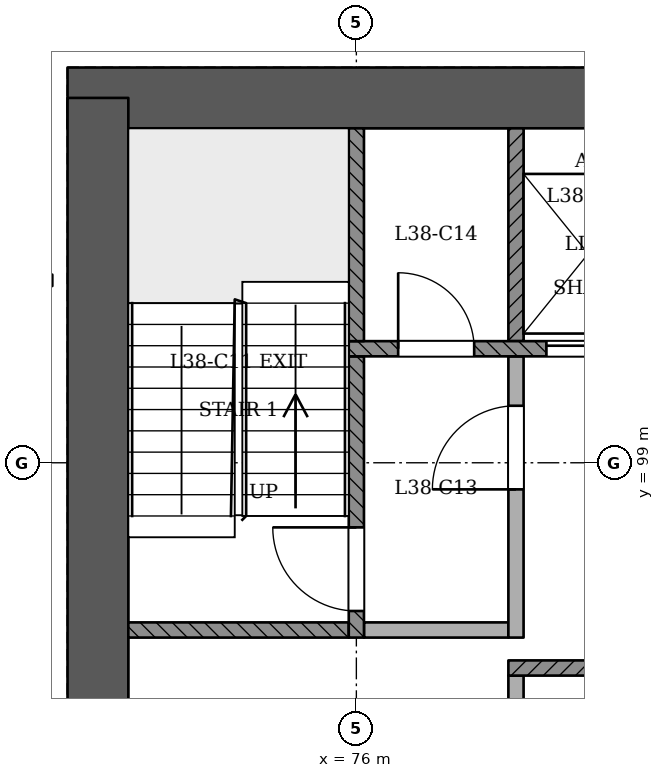
"""IFC4 building model, lengths in metres.
Left out: names, types, materials, properties, quantities, classifications, styles, units other than length and angle.
Written with IfcOpenShell. Run it as: python <this file> out.ifc"""

import sys

from ifc_helpers import new_model, si_unit, direction, frame, frame_2d, origin, place, context, subcontext, project, spatial, rectangle, extrude, element, fill, save


model = new_model("IFC4")
c1 = context("Model", 3, precision=1e-05, world=origin(), true_north=direction((0.0, 1.0)))
c2 = subcontext(c1, "Body", "Model", "MODEL_VIEW")
j1 = project(units=[si_unit("LENGTHUNIT", "METRE"), si_unit("PLANEANGLEUNIT", "RADIAN")], contexts=[c1])
p1 = place(None, origin())
s1 = spatial("IfcSite", under=j1, at=p1, CompositionType="ELEMENT")
p2 = place(p1, origin())
s2 = spatial("IfcBuilding", under=s1, at=p2, CompositionType="ELEMENT")
p3 = place(p2, frame((0.0, 0.0, 149.4)))
s3 = spatial("IfcBuildingStorey", under=s2, at=p3, CompositionType="ELEMENT", Elevation=149.4)
p4 = place(p3, frame((97.4, 103.8, 0.0), z_axis=(0.0, 0.0, 1.0), x_axis=(-1.0, 0.0, 0.0)))
e1 = element("IfcWall", 1, at=p4, inside=s3, PredefinedType="SHEAR", context=c2, shape_type="SweptSolid", body=[
    extrude(rectangle(XDim=25.2, YDim=0.8, at=frame_2d((12.6, 0.0))), origin(), (0.0, 0.0, 1.0), 3.6),
])
p5 = place(p3, frame((72.6, 103.8, 0.0), z_axis=(0.0, 0.0, 1.0), x_axis=(0.0, -1.0, 0.0)))
e2 = element("IfcWall", 2, at=p5, inside=s3, PredefinedType="SHEAR", context=c2, shape_type="SweptSolid", body=[
    extrude(rectangle(XDim=11.2, YDim=0.8, at=frame_2d((5.6, 0.0))), origin(), (0.0, 0.0, 1.0), 3.6),
])
p6 = place(p3, frame((65.324, 98.5, 0.0), z_axis=(0.0, 0.0, 1.0), x_axis=(0.500001898363, -0.866024307761, 0.0)))
e3 = element("IfcWall", 3, at=p6, inside=s3, PredefinedType="PARTITIONING", context=c2, shape_type="SweptSolid", body=[
    extrude(rectangle(XDim=39.351, YDim=0.15, at=frame_2d((19.675, 0.0))), origin(), (0.0, 0.0, 1.0), 2.75),
])
p7 = place(p6, frame((0.2, 0.0, 0.0)))
e4 = element("IfcOpeningElement", 4, at=p7, cuts=e3, PredefinedType="OPENING", context=c2, shape_type="SweptSolid", body=[
    extrude(rectangle(XDim=1.2, YDim=2.1, at=frame_2d((0.6, 1.05))), frame((0.0, 0.085, 0.0), z_axis=(0.0, -1.0, 0.0), x_axis=(1.0, 0.0, 0.0)), (0.0, 0.0, 1.0), 0.171),
])
p8 = place(p6, frame((3.425, 0.0, 0.0)))
e5 = element("IfcOpeningElement", 5, at=p8, cuts=e3, PredefinedType="OPENING", context=c2, shape_type="SweptSolid", body=[
    extrude(rectangle(XDim=1.0, YDim=2.1, at=frame_2d((0.5, 1.05))), frame((0.0, 0.085, 0.0), z_axis=(0.0, -1.0, 0.0), x_axis=(1.0, 0.0, 0.0)), (0.0, 0.0, 1.0), 0.171),
])
p9 = place(p6, frame((9.004, 0.0, 0.0)))
e6 = element("IfcOpeningElement", 6, at=p9, cuts=e3, PredefinedType="OPENING", context=c2, shape_type="SweptSolid", body=[
    extrude(rectangle(XDim=1.1, YDim=2.1, at=frame_2d((0.55, 1.05))), frame((0.0, 0.085, 0.0), z_axis=(0.0, -1.0, 0.0), x_axis=(1.0, 0.0, 0.0)), (0.0, 0.0, 1.0), 0.171),
])
p10 = place(p6, frame((11.396, 0.0, 0.0)))
e7 = element("IfcOpeningElement", 7, at=p10, cuts=e3, PredefinedType="OPENING", context=c2, shape_type="SweptSolid", body=[
    extrude(rectangle(XDim=1.0, YDim=2.1, at=frame_2d((0.5, 1.05))), frame((0.0, 0.085, 0.0), z_axis=(0.0, -1.0, 0.0), x_axis=(1.0, 0.0, 0.0)), (0.0, 0.0, 1.0), 0.171),
])
p11 = place(p6, frame((17.955, 0.0, 0.0)))
e8 = element("IfcOpeningElement", 8, at=p11, cuts=e3, PredefinedType="OPENING", context=c2, shape_type="SweptSolid", body=[
    extrude(rectangle(XDim=1.0, YDim=2.1, at=frame_2d((0.5, 1.05))), frame((0.0, 0.085, 0.0), z_axis=(0.0, -1.0, 0.0), x_axis=(1.0, 0.0, 0.0)), (0.0, 0.0, 1.0), 0.171),
])
p12 = place(p6, frame((20.396, 0.0, 0.0)))
e9 = element("IfcOpeningElement", 9, at=p12, cuts=e3, PredefinedType="OPENING", context=c2, shape_type="SweptSolid", body=[
    extrude(rectangle(XDim=1.0, YDim=2.1, at=frame_2d((0.5, 1.05))), frame((0.0, 0.085, 0.0), z_axis=(0.0, -1.0, 0.0), x_axis=(1.0, 0.0, 0.0)), (0.0, 0.0, 1.0), 0.171),
])
p13 = place(p6, frame((26.955, 0.0, 0.0)))
e10 = element("IfcOpeningElement", 10, at=p13, cuts=e3, PredefinedType="OPENING", context=c2, shape_type="SweptSolid", body=[
    extrude(rectangle(XDim=1.0, YDim=2.1, at=frame_2d((0.5, 1.05))), frame((0.0, 0.085, 0.0), z_axis=(0.0, -1.0, 0.0), x_axis=(1.0, 0.0, 0.0)), (0.0, 0.0, 1.0), 0.171),
])
p14 = place(p6, frame((29.396, 0.0, 0.0)))
e11 = element("IfcOpeningElement", 11, at=p14, cuts=e3, PredefinedType="OPENING", context=c2, shape_type="SweptSolid", body=[
    extrude(rectangle(XDim=1.0, YDim=2.1, at=frame_2d((0.5, 1.05))), frame((0.0, 0.085, 0.0), z_axis=(0.0, -1.0, 0.0), x_axis=(1.0, 0.0, 0.0)), (0.0, 0.0, 1.0), 0.171),
])
p15 = place(p6, frame((36.004, 0.0, 0.0)))
e12 = element("IfcOpeningElement", 12, at=p15, cuts=e3, PredefinedType="OPENING", context=c2, shape_type="SweptSolid", body=[
    extrude(rectangle(XDim=1.1, YDim=2.1, at=frame_2d((0.55, 1.05))), frame((0.0, 0.085, 0.0), z_axis=(0.0, -1.0, 0.0), x_axis=(1.0, 0.0, 0.0)), (0.0, 0.0, 1.0), 0.171),
])
p16 = place(p3, frame((78.1, 93.4, 0.0), z_axis=(0.0, 0.0, 1.0), x_axis=(0.0, 1.0, 0.0)))
e13 = element("IfcWall", 13, at=p16, inside=s3, PredefinedType="PARTITIONING", context=c2, shape_type="SweptSolid", body=[
    extrude(rectangle(XDim=2.8, YDim=0.2, at=frame_2d((1.4, 0.0))), origin(), (0.0, 0.0, 1.0), 3.15),
])
p17 = place(p3, frame((78.0, 96.3, 0.0), z_axis=(0.0, 0.0, 1.0), x_axis=(1.0, 0.0, 0.0)))
e14 = element("IfcWall", 14, at=p17, inside=s3, PredefinedType="SOLIDWALL", context=c2, shape_type="SweptSolid", body=[
    extrude(rectangle(XDim=7.8, YDim=0.2, at=frame_2d((3.9, 0.0))), origin(), (0.0, 0.0, 1.0), 3.15),
])
p18 = place(p17, frame((1.5, 0.0, 0.0)))
e15 = element("IfcOpeningElement", 15, at=p18, cuts=e14, PredefinedType="OPENING", context=c2, shape_type="SweptSolid", body=[
    extrude(rectangle(XDim=1.0, YDim=2.1, at=frame_2d((0.5, 1.05))), frame((0.0, 0.11, 0.0), z_axis=(0.0, -1.0, 0.0), x_axis=(1.0, 0.0, 0.0)), (0.0, 0.0, 1.0), 0.221),
])
p19 = place(p3, frame((73.0, 96.8, 0.0), z_axis=(0.0, 0.0, 1.0), x_axis=(1.0, 0.0, 0.0)))
e16 = element("IfcWall", 16, at=p19, inside=s3, PredefinedType="SOLIDWALL", context=c2, shape_type="SweptSolid", body=[
    extrude(rectangle(XDim=2.9, YDim=0.2, at=frame_2d((1.45, 0.0))), origin(), (0.0, 0.0, 1.0), 3.15),
])
p20 = place(p3, frame((76.0, 96.7, 0.0), z_axis=(0.0, 0.0, 1.0), x_axis=(0.0, 1.0, 0.0)))
e17 = element("IfcWall", 17, at=p20, inside=s3, PredefinedType="SOLIDWALL", context=c2, shape_type="SweptSolid", body=[
    extrude(rectangle(XDim=3.7, YDim=0.2, at=frame_2d((1.85, 0.0))), origin(), (0.0, 0.0, 1.0), 3.15),
])
p21 = place(p20, frame((0.35, 0.0, 0.0)))
e18 = element("IfcOpeningElement", 18, at=p21, cuts=e17, PredefinedType="OPENING", context=c2, shape_type="SweptSolid", body=[
    extrude(rectangle(XDim=1.1, YDim=2.1, at=frame_2d((0.55, 1.05))), frame((0.0, 0.11, 0.0), z_axis=(0.0, -1.0, 0.0), x_axis=(1.0, 0.0, 0.0)), (0.0, 0.0, 1.0), 0.221),
])
p22 = place(p3, frame((76.1, 96.8, 0.0), z_axis=(0.0, 0.0, 1.0), x_axis=(1.0, 0.0, 0.0)))
e19 = element("IfcWall", 19, at=p22, inside=s3, PredefinedType="PARTITIONING", context=c2, shape_type="SweptSolid", body=[
    extrude(rectangle(XDim=1.9, YDim=0.2, at=frame_2d((0.95, 0.0))), origin(), (0.0, 0.0, 1.0), 3.15),
])
p23 = place(p3, frame((78.1, 96.7, 0.0), z_axis=(0.0, 0.0, 1.0), x_axis=(0.0, 1.0, 0.0)))
e20 = element("IfcWall", 20, at=p23, inside=s3, PredefinedType="PARTITIONING", context=c2, shape_type="SweptSolid", body=[
    extrude(rectangle(XDim=3.7, YDim=0.2, at=frame_2d((1.85, 0.0))), origin(), (0.0, 0.0, 1.0), 3.15),
])
p24 = place(p23, frame((1.95, 0.0, 0.0)))
e21 = element("IfcOpeningElement", 21, at=p24, cuts=e20, PredefinedType="OPENING", context=c2, shape_type="SweptSolid", body=[
    extrude(rectangle(XDim=1.1, YDim=2.1, at=frame_2d((0.55, 1.05))), frame((0.0, 0.11, 0.0), z_axis=(0.0, -1.0, 0.0), x_axis=(1.0, 0.0, 0.0)), (0.0, 0.0, 1.0), 0.221),
])
p25 = place(p3, frame((75.9, 100.5, 0.0), z_axis=(0.0, 0.0, 1.0), x_axis=(1.0, 0.0, 0.0)))
e22 = element("IfcWall", 22, at=p25, inside=s3, PredefinedType="SOLIDWALL", context=c2, shape_type="SweptSolid", body=[
    extrude(rectangle(XDim=18.2, YDim=0.2, at=frame_2d((9.1, 0.0))), origin(), (0.0, 0.0, 1.0), 3.15),
])
p26 = place(p25, frame((2.6, 0.0, 0.0)))
e23 = element("IfcOpeningElement", 23, at=p26, cuts=e22, PredefinedType="OPENING", context=c2, shape_type="SweptSolid", body=[
    extrude(rectangle(XDim=1.1, YDim=2.1, at=frame_2d((0.55, 1.05))), frame((0.0, 0.11, 0.0), z_axis=(0.0, -1.0, 0.0), x_axis=(1.0, 0.0, 0.0)), (0.0, 0.0, 1.0), 0.221),
])
p27 = place(p25, frame((4.5, 0.0, 0.0)))
e24 = element("IfcOpeningElement", 24, at=p27, cuts=e22, PredefinedType="OPENING", context=c2, shape_type="SweptSolid", body=[
    extrude(rectangle(XDim=1.1, YDim=2.1, at=frame_2d((0.55, 1.05))), frame((0.0, 0.11, 0.0), z_axis=(0.0, -1.0, 0.0), x_axis=(1.0, 0.0, 0.0)), (0.0, 0.0, 1.0), 0.221),
])
p28 = place(p25, frame((6.4, 0.0, 0.0)))
e25 = element("IfcOpeningElement", 25, at=p28, cuts=e22, PredefinedType="OPENING", context=c2, shape_type="SweptSolid", body=[
    extrude(rectangle(XDim=1.1, YDim=2.1, at=frame_2d((0.55, 1.05))), frame((0.0, 0.11, 0.0), z_axis=(0.0, -1.0, 0.0), x_axis=(1.0, 0.0, 0.0)), (0.0, 0.0, 1.0), 0.221),
])
p29 = place(p25, frame((8.3, 0.0, 0.0)))
e26 = element("IfcOpeningElement", 26, at=p29, cuts=e22, PredefinedType="OPENING", context=c2, shape_type="SweptSolid", body=[
    extrude(rectangle(XDim=1.1, YDim=2.1, at=frame_2d((0.55, 1.05))), frame((0.0, 0.11, 0.0), z_axis=(0.0, -1.0, 0.0), x_axis=(1.0, 0.0, 0.0)), (0.0, 0.0, 1.0), 0.221),
])
p30 = place(p25, frame((10.2, 0.0, 0.0)))
e27 = element("IfcOpeningElement", 27, at=p30, cuts=e22, PredefinedType="OPENING", context=c2, shape_type="SweptSolid", body=[
    extrude(rectangle(XDim=1.1, YDim=2.1, at=frame_2d((0.55, 1.05))), frame((0.0, 0.11, 0.0), z_axis=(0.0, -1.0, 0.0), x_axis=(1.0, 0.0, 0.0)), (0.0, 0.0, 1.0), 0.221),
])
p31 = place(p25, frame((12.1, 0.0, 0.0)))
e28 = element("IfcOpeningElement", 28, at=p31, cuts=e22, PredefinedType="OPENING", context=c2, shape_type="SweptSolid", body=[
    extrude(rectangle(XDim=1.1, YDim=2.1, at=frame_2d((0.55, 1.05))), frame((0.0, 0.11, 0.0), z_axis=(0.0, -1.0, 0.0), x_axis=(1.0, 0.0, 0.0)), (0.0, 0.0, 1.0), 0.221),
])
p32 = place(p25, frame((14.0, 0.0, 0.0)))
e29 = element("IfcOpeningElement", 29, at=p32, cuts=e22, PredefinedType="OPENING", context=c2, shape_type="SweptSolid", body=[
    extrude(rectangle(XDim=1.1, YDim=2.1, at=frame_2d((0.55, 1.05))), frame((0.0, 0.11, 0.0), z_axis=(0.0, -1.0, 0.0), x_axis=(1.0, 0.0, 0.0)), (0.0, 0.0, 1.0), 0.221),
])
p33 = place(p25, frame((0.65, 0.0, 0.0)))
e30 = element("IfcOpeningElement", 30, at=p33, cuts=e22, PredefinedType="OPENING", context=c2, shape_type="SweptSolid", body=[
    extrude(rectangle(XDim=1.0, YDim=2.1, at=frame_2d((0.5, 1.05))), frame((0.0, 0.11, 0.0), z_axis=(0.0, -1.0, 0.0), x_axis=(1.0, 0.0, 0.0)), (0.0, 0.0, 1.0), 0.221),
])
p34 = place(p25, frame((16.3, 0.0, 0.0)))
e31 = element("IfcOpeningElement", 31, at=p34, cuts=e22, PredefinedType="OPENING", context=c2, shape_type="SweptSolid", body=[
    extrude(rectangle(XDim=1.0, YDim=2.1, at=frame_2d((0.5, 1.05))), frame((0.0, 0.11, 0.0), z_axis=(0.0, -1.0, 0.0), x_axis=(1.0, 0.0, 0.0)), (0.0, 0.0, 1.0), 0.221),
])
for number, where, z_axis, x_axis in (
    (32, (76.0, 100.6, 0.0), (0.0, 0.0, 1.0), (0.0, 1.0, 0.0)),
    (33, (78.1, 100.6, 0.0), (0.0, 0.0, 1.0), (0.0, 1.0, 0.0)),
):
    element("IfcWall", number, at=place(p3, frame(where, z_axis=z_axis, x_axis=x_axis)), inside=s3, PredefinedType="SOLIDWALL", context=c2, shape_type="SweptSolid", body=[
        extrude(rectangle(XDim=2.8, YDim=0.2, at=frame_2d((1.4, 0.0))), origin(), (0.0, 0.0, 1.0), 3.15),
    ])
p35 = place(p26, origin())
e34 = element("IfcDoor", 34, at=p35, inside=s3, OperationType="SLIDING_TO_RIGHT", PredefinedType="NOTDEFINED", context=c2, shape_type="SweptSolid", body=[
    extrude(rectangle(XDim=1.1, YDim=2.1, at=frame_2d((0.55, 1.05))), frame((0.0, 0.025, 0.0), z_axis=(0.0, -1.0, 0.0), x_axis=(1.0, 0.0, 0.0)), (0.0, 0.0, 1.0), 0.05),
])
fill(e23, e34)
p36 = place(p21, origin())
e35 = element("IfcDoor", 35, at=p36, inside=s3, OperationType="SINGLE_SWING_RIGHT", PredefinedType="NOTDEFINED", context=c2, shape_type="SweptSolid", body=[
    extrude(rectangle(XDim=1.1, YDim=2.1, at=frame_2d((0.55, 1.05))), frame((0.0, 0.025, 0.0), z_axis=(0.0, -1.0, 0.0), x_axis=(1.0, 0.0, 0.0)), (0.0, 0.0, 1.0), 0.05),
])
fill(e18, e35)
p37 = place(p24, origin())
e36 = element("IfcDoor", 36, at=p37, inside=s3, OperationType="SINGLE_SWING_LEFT", PredefinedType="NOTDEFINED", context=c2, shape_type="SweptSolid", body=[
    extrude(rectangle(XDim=1.1, YDim=2.1, at=frame_2d((0.55, 1.05))), frame((0.0, 0.025, 0.0), z_axis=(0.0, -1.0, 0.0), x_axis=(1.0, 0.0, 0.0)), (0.0, 0.0, 1.0), 0.05),
])
fill(e21, e36)
p38 = place(p33, origin())
e37 = element("IfcDoor", 37, at=p38, inside=s3, OperationType="SINGLE_SWING_LEFT", PredefinedType="NOTDEFINED", context=c2, shape_type="SweptSolid", body=[
    extrude(rectangle(XDim=1.0, YDim=2.1, at=frame_2d((0.5, 1.05))), frame((0.0, 0.025, 0.0), z_axis=(0.0, -1.0, 0.0), x_axis=(1.0, 0.0, 0.0)), (0.0, 0.0, 1.0), 0.05),
])
fill(e30, e37)
save(model, sys.argv[1])
